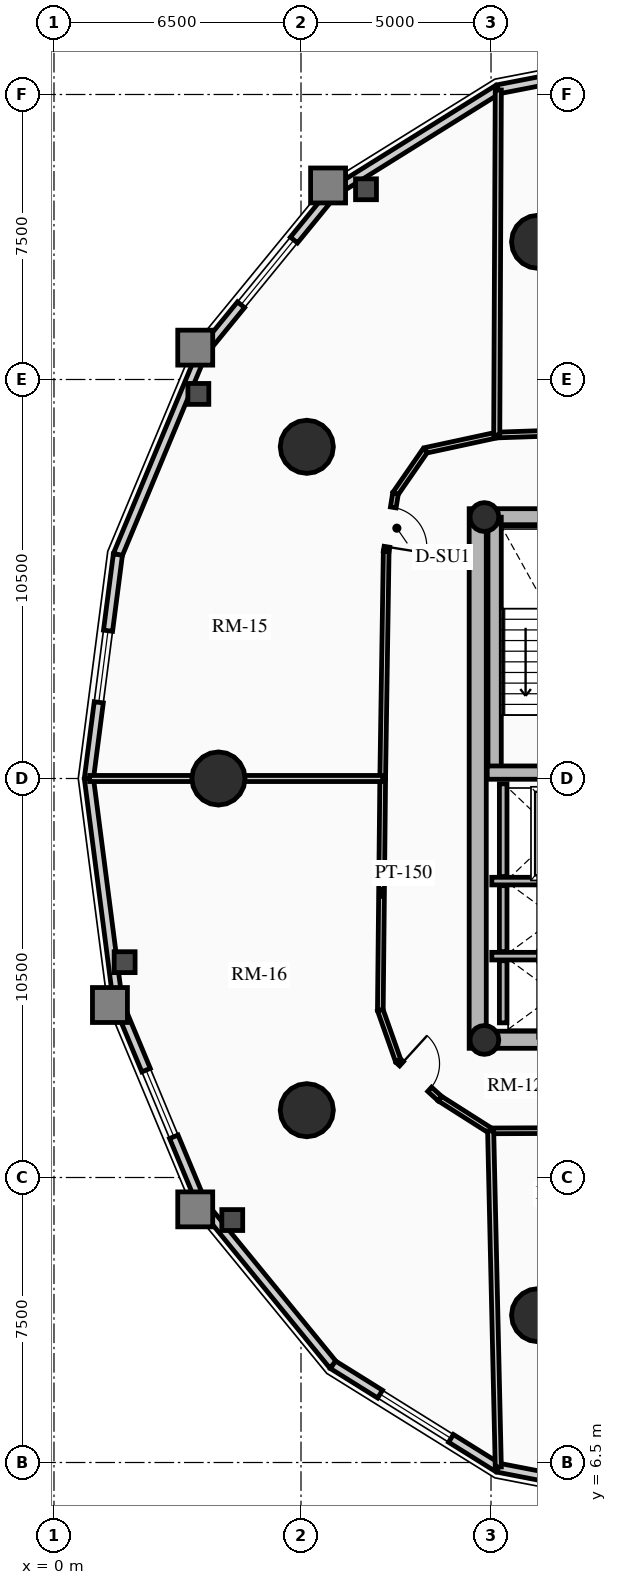
"""IFC4 building model, lengths in metres.
Left out: names, types, materials, properties, quantities, classifications, styles, units other than length and angle.
Written with IfcOpenShell. Run it as: python <this file> out.ifc"""

import sys

from ifc_helpers import new_model, si_unit, direction, frame, frame_2d, origin, origin_2d, place, context, subcontext, project, spatial, rectangle, circle, hollow_circle, extrude, source, transform, mapped, element, fill, save


model = new_model("IFC4")
c1 = context("Model", 3, precision=1e-05, world=origin(), true_north=direction((0.0, 1.0)))
c2 = subcontext(c1, "Body", "Model", "MODEL_VIEW")
j1 = project(units=[si_unit("LENGTHUNIT", "METRE"), si_unit("PLANEANGLEUNIT", "RADIAN")], contexts=[c1])
p1 = place(None, origin())
s1 = spatial("IfcSite", under=j1, at=p1, CompositionType="ELEMENT")
p2 = place(p1, origin())
s2 = spatial("IfcBuilding", under=s1, at=p2, CompositionType="ELEMENT")
p3 = place(p2, frame((0.0, 0.0, 140.32)))
s3 = spatial("IfcBuildingStorey", under=s2, at=p3, CompositionType="ELEMENT", Elevation=140.32)
p4 = place(p3, frame((11.15, 17.4, 0.0), z_axis=(0.0, 0.0, 1.0), x_axis=(0.0, 1.0, 0.0)))
e1 = element("IfcWall", 1, at=p4, inside=s3, PredefinedType="SHEAR", context=c2, shape_type="SweptSolid", body=[
    extrude(rectangle(XDim=14.2, YDim=0.45, at=frame_2d((7.1, 0.0))), origin(), (0.0, 0.0, 1.0), 3.72),
])
p5 = place(p3, frame((11.15, 17.625, 0.0), z_axis=(0.0, 0.0, 1.0), x_axis=(1.0, 0.0, 0.0)))
e2 = element("IfcWall", 2, at=p5, inside=s3, PredefinedType="SHEAR", context=c2, shape_type="SweptSolid", body=[
    extrude(rectangle(XDim=10.7, YDim=0.45, at=frame_2d((5.35, 0.0))), origin(), (0.0, 0.0, 1.0), 3.72),
])
m1 = source(origin(), c2, "Body", "SweptSolid", [
    extrude(rectangle(XDim=1.5, YDim=2.02, at=frame_2d((0.75, 1.01))), frame((0.0, 0.235, 0.0), z_axis=(0.0, -1.0, 0.0), x_axis=(1.0, 0.0, 0.0)), (0.0, 0.0, 1.0), 0.47),
])
p6 = place(p5, frame((5.45, 0.0, 0.0)))
e3 = element("IfcOpeningElement", 3, at=p6, cuts=e2, PredefinedType="OPENING", context=c2, shape_type="MappedRepresentation", body=[
    mapped(m1, transform((0.0, 0.0, 0.0), x_axis=(1.0, 0.0, 0.0), y_axis=(0.0, 1.0, 0.0), z_axis=(0.0, 0.0, 1.0), scale=1.0)),
])
p7 = place(p3, frame((11.15, 31.375, 0.0), z_axis=(0.0, 0.0, 1.0), x_axis=(1.0, 0.0, 0.0)))
e4 = element("IfcWall", 4, at=p7, inside=s3, PredefinedType="SHEAR", context=c2, shape_type="SweptSolid", body=[
    extrude(rectangle(XDim=10.7, YDim=0.45, at=frame_2d((5.35, 0.0))), origin(), (0.0, 0.0, 1.0), 3.72),
])
p8 = place(p7, frame((4.6, 0.0, 0.0)))
e5 = element("IfcOpeningElement", 5, at=p8, cuts=e4, PredefinedType="OPENING", context=c2, shape_type="MappedRepresentation", body=[
    mapped(m1, transform((0.0, 0.0, 0.0), x_axis=(1.0, 0.0, 0.0), y_axis=(0.0, 1.0, 0.0), z_axis=(0.0, 0.0, 1.0), scale=1.0)),
])
p9 = place(p3, frame((11.595, 24.655, 0.0), z_axis=(0.0, 0.0, 1.0), x_axis=(0.0, 1.0, 0.0)))
e6 = element("IfcWall", 6, at=p9, inside=s3, PredefinedType="SHEAR", context=c2, shape_type="SweptSolid", body=[
    extrude(rectangle(XDim=6.72, YDim=0.35, at=frame_2d((3.36, 0.0))), origin(), (0.0, 0.0, 1.0), 3.72),
])
p10 = place(p3, frame((11.4, 24.655, 0.0), z_axis=(0.0, 0.0, 1.0), x_axis=(1.0, 0.0, 0.0)))
e7 = element("IfcWall", 7, at=p10, inside=s3, PredefinedType="SHEAR", context=c2, shape_type="SweptSolid", body=[
    extrude(rectangle(XDim=3.285, YDim=0.35, at=frame_2d((1.643, 0.0))), origin(), (0.0, 0.0, 1.0), 3.72),
])
for number, where, z_axis, x_axis in (
    (8, (11.325, 17.62, 0.0), (0.0, 0.0, 1.0), (1.0, 0.0, 0.0)),
    (9, (11.325, 31.38, 0.0), (0.0, 0.0, 1.0), (1.0, 0.0, 0.0)),
):
    element("IfcColumn", number, at=place(p3, frame(where, z_axis=z_axis, x_axis=x_axis)), inside=s3, PredefinedType="COLUMN", context=c2, shape_type="SweptSolid", body=[
        extrude(hollow_circle(Radius=0.38, WallThickness=0.032, at=origin_2d()), origin(), (0.0, 0.0, 1.0), 3.72),
    ])
for number, where, z_axis, x_axis in (
    (10, (12.739, 38.623, 0.0), (0.0, 0.0, 1.0), (1.0, 0.0, 0.0)),
    (11, (6.653, 33.229, 0.0), (0.0, 0.0, 1.0), (1.0, 0.0, 0.0)),
    (12, (4.328, 24.5, 0.0), (0.0, 0.0, 1.0), (1.0, 0.0, 0.0)),
    (13, (6.653, 15.771, 0.0), (0.0, 0.0, 1.0), (1.0, 0.0, 0.0)),
    (14, (12.739, 10.377, 0.0), (0.0, 0.0, 1.0), (1.0, 0.0, 0.0)),
):
    element("IfcColumn", number, at=place(p3, frame(where, z_axis=z_axis, x_axis=x_axis)), inside=s3, PredefinedType="USERDEFINED", context=c2, shape_type="SweptSolid", body=[
        extrude(circle(Radius=0.7, at=origin_2d()), origin(), (0.0, 0.0, 1.0), 3.72),
    ])
p11 = place(p3, frame((11.685, 42.637, 0.0), z_axis=(0.0, 0.0, 1.0), x_axis=(0.981723785992, 0.190311344954, 0.0)))
e15 = element("IfcWall", 15, at=p11, inside=s3, PredefinedType="SOLIDWALL", context=c2, shape_type="SweptSolid", body=[
    extrude(rectangle(XDim=4.904, YDim=0.24, at=frame_2d((2.452, 0.0))), origin(), (0.0, 0.0, 1.0), 3.465),
])
m2 = source(origin(), c2, "Body", "SweptSolid", [
    extrude(rectangle(XDim=1.9, YDim=1.35, at=frame_2d((0.95, 0.675))), frame((0.0, 0.13, 0.0), z_axis=(0.0, -1.0, 0.0), x_axis=(1.0, 0.0, 0.0)), (0.0, 0.0, 1.0), 0.26),
])
p12 = place(p11, frame((1.502, 0.0, 0.65)))
e16 = element("IfcOpeningElement", 16, at=p12, cuts=e15, PredefinedType="OPENING", context=c2, shape_type="MappedRepresentation", body=[
    mapped(m2, transform((0.0, 0.0, 0.0), x_axis=(1.0, 0.0, 0.0), y_axis=(0.0, 1.0, 0.0), z_axis=(0.0, 0.0, 1.0), scale=1.0)),
])
p13 = place(p3, frame((7.342, 39.928, 0.0), z_axis=(0.0, 0.0, 1.0), x_axis=(0.848520380187, 0.529162701263, 0.0)))
e17 = element("IfcWall", 17, at=p13, inside=s3, PredefinedType="SOLIDWALL", context=c2, shape_type="SweptSolid", body=[
    extrude(rectangle(XDim=5.119, YDim=0.24, at=frame_2d((2.56, 0.0))), origin(), (0.0, 0.0, 1.0), 3.465),
])
p14 = place(p3, frame((3.895, 35.709, 0.0), z_axis=(0.0, 0.0, 1.0), x_axis=(0.632700781152, 0.77439635945, 0.0)))
e18 = element("IfcWall", 18, at=p14, inside=s3, PredefinedType="SOLIDWALL", context=c2, shape_type="SweptSolid", body=[
    extrude(rectangle(XDim=5.448, YDim=0.24, at=frame_2d((2.724, 0.0))), origin(), (0.0, 0.0, 1.0), 3.465),
])
m3 = source(origin(), c2, "Body", "SweptSolid", [
    extrude(rectangle(XDim=2.2, YDim=1.35, at=frame_2d((1.1, 0.675))), frame((0.0, 0.13, 0.0), z_axis=(0.0, -1.0, 0.0), x_axis=(1.0, 0.0, 0.0)), (0.0, 0.0, 1.0), 0.26),
])
p15 = place(p14, frame((1.624, 0.0, 0.65)))
e19 = element("IfcOpeningElement", 19, at=p15, cuts=e18, PredefinedType="OPENING", context=c2, shape_type="MappedRepresentation", body=[
    mapped(m3, transform((0.0, 0.0, 0.0), x_axis=(1.0, 0.0, 0.0), y_axis=(0.0, 1.0, 0.0), z_axis=(0.0, 0.0, 1.0), scale=1.0)),
])
p16 = place(p3, frame((1.682, 30.393, 0.0), z_axis=(0.0, 0.0, 1.0), x_axis=(0.384344417632, 0.923189779317, 0.0)))
e20 = element("IfcWall", 20, at=p16, inside=s3, PredefinedType="SOLIDWALL", context=c2, shape_type="SweptSolid", body=[
    extrude(rectangle(XDim=5.758, YDim=0.24, at=frame_2d((2.879, 0.0))), origin(), (0.0, 0.0, 1.0), 3.465),
])
p17 = place(p3, frame((0.919, 24.5, 0.0), z_axis=(0.0, 0.0, 1.0), x_axis=(0.128351991996, 0.991728675672, 0.0)))
e21 = element("IfcWall", 21, at=p17, inside=s3, PredefinedType="SOLIDWALL", context=c2, shape_type="SweptSolid", body=[
    extrude(rectangle(XDim=5.942, YDim=0.24, at=frame_2d((2.971, 0.0))), origin(), (0.0, 0.0, 1.0), 3.465),
])
p18 = place(p17, frame((2.021, 0.0, 0.65)))
e22 = element("IfcOpeningElement", 22, at=p18, cuts=e21, PredefinedType="OPENING", context=c2, shape_type="MappedRepresentation", body=[
    mapped(m2, transform((0.0, 0.0, 0.0), x_axis=(1.0, 0.0, 0.0), y_axis=(0.0, 1.0, 0.0), z_axis=(0.0, 0.0, 1.0), scale=1.0)),
])
p19 = place(p3, frame((1.682, 18.607, 0.0), z_axis=(0.0, 0.0, 1.0), x_axis=(-0.128351991996, 0.991728675672, 0.0)))
e23 = element("IfcWall", 23, at=p19, inside=s3, PredefinedType="SOLIDWALL", context=c2, shape_type="SweptSolid", body=[
    extrude(rectangle(XDim=5.942, YDim=0.24, at=frame_2d((2.971, 0.0))), origin(), (0.0, 0.0, 1.0), 3.465),
])
p20 = place(p3, frame((3.895, 13.291, 0.0), z_axis=(0.0, 0.0, 1.0), x_axis=(-0.384344417632, 0.923189779317, 0.0)))
e24 = element("IfcWall", 24, at=p20, inside=s3, PredefinedType="SOLIDWALL", context=c2, shape_type="SweptSolid", body=[
    extrude(rectangle(XDim=5.758, YDim=0.24, at=frame_2d((2.879, 0.0))), origin(), (0.0, 0.0, 1.0), 3.465),
])
p21 = place(p20, frame((1.929, 0.0, 0.65)))
e25 = element("IfcOpeningElement", 25, at=p21, cuts=e24, PredefinedType="OPENING", context=c2, shape_type="MappedRepresentation", body=[
    mapped(m2, transform((0.0, 0.0, 0.0), x_axis=(1.0, 0.0, 0.0), y_axis=(0.0, 1.0, 0.0), z_axis=(0.0, 0.0, 1.0), scale=1.0)),
])
p22 = place(p3, frame((7.342, 9.072, 0.0), z_axis=(0.0, 0.0, 1.0), x_axis=(-0.632700781152, 0.77439635945, 0.0)))
e26 = element("IfcWall", 26, at=p22, inside=s3, PredefinedType="SOLIDWALL", context=c2, shape_type="SweptSolid", body=[
    extrude(rectangle(XDim=5.448, YDim=0.24, at=frame_2d((2.724, 0.0))), origin(), (0.0, 0.0, 1.0), 3.465),
])
p23 = place(p3, frame((11.685, 6.363, 0.0), z_axis=(0.0, 0.0, 1.0), x_axis=(-0.848520380187, 0.529162701263, 0.0)))
e27 = element("IfcWall", 27, at=p23, inside=s3, PredefinedType="SOLIDWALL", context=c2, shape_type="SweptSolid", body=[
    extrude(rectangle(XDim=5.119, YDim=0.24, at=frame_2d((2.56, 0.0))), origin(), (0.0, 0.0, 1.0), 3.465),
])
p24 = place(p23, frame((1.459, 0.0, 0.65)))
e28 = element("IfcOpeningElement", 28, at=p24, cuts=e27, PredefinedType="OPENING", context=c2, shape_type="MappedRepresentation", body=[
    mapped(m3, transform((0.0, 0.0, 0.0), x_axis=(1.0, 0.0, 0.0), y_axis=(0.0, 1.0, 0.0), z_axis=(0.0, 0.0, 1.0), scale=1.0)),
])
p25 = place(p3, frame((16.5, 5.43, 0.0), z_axis=(0.0, 0.0, 1.0), x_axis=(-0.981723785992, 0.190311344954, 0.0)))
e29 = element("IfcWall", 29, at=p25, inside=s3, PredefinedType="SOLIDWALL", context=c2, shape_type="SweptSolid", body=[
    extrude(rectangle(XDim=4.904, YDim=0.24, at=frame_2d((2.452, 0.0))), origin(), (0.0, 0.0, 1.0), 3.465),
])
p26 = place(p25, frame((1.502, 0.0, 0.65)))
e30 = element("IfcOpeningElement", 30, at=p26, cuts=e29, PredefinedType="OPENING", context=c2, shape_type="MappedRepresentation", body=[
    mapped(m2, transform((0.0, 0.0, 0.0), x_axis=(1.0, 0.0, 0.0), y_axis=(0.0, 1.0, 0.0), z_axis=(0.0, 0.0, 1.0), scale=1.0)),
])
p27 = place(p3, frame((11.52, 21.8, 0.0), z_axis=(0.0, 0.0, 1.0), x_axis=(1.0, 0.0, 0.0)))
e31 = element("IfcWall", 31, at=p27, inside=s3, PredefinedType="SHEAR", context=c2, shape_type="SweptSolid", body=[
    extrude(rectangle(XDim=2.97, YDim=0.2, at=frame_2d((1.485, 0.0))), origin(), (0.0, 0.0, 1.0), 3.72),
])
p28 = place(p3, frame((11.82, 21.92, 0.0), z_axis=(0.0, 0.0, 1.0), x_axis=(0.0, 1.0, 0.0)))
e32 = element("IfcWall", 32, at=p28, inside=s3, PredefinedType="SHEAR", context=c2, shape_type="SweptSolid", body=[
    extrude(rectangle(XDim=2.44, YDim=0.2, at=frame_2d((1.22, 0.0))), origin(), (0.0, 0.0, 1.0), 3.72),
])
p29 = place(p3, frame((11.52, 19.825, 0.0), z_axis=(0.0, 0.0, 1.0), x_axis=(1.0, 0.0, 0.0)))
e33 = element("IfcWall", 33, at=p29, inside=s3, PredefinedType="SHEAR", context=c2, shape_type="SweptSolid", body=[
    extrude(rectangle(XDim=2.97, YDim=0.2, at=frame_2d((1.485, 0.0))), origin(), (0.0, 0.0, 1.0), 3.72),
])
p30 = place(p3, frame((11.82, 19.945, 0.0), z_axis=(0.0, 0.0, 1.0), x_axis=(0.0, 1.0, 0.0)))
e34 = element("IfcWall", 34, at=p30, inside=s3, PredefinedType="SHEAR", context=c2, shape_type="SweptSolid", body=[
    extrude(rectangle(XDim=1.735, YDim=0.2, at=frame_2d((0.867, 0.0))), origin(), (0.0, 0.0, 1.0), 3.72),
])
p31 = place(p3, frame((11.82, 18.07, 0.0), z_axis=(0.0, 0.0, 1.0), x_axis=(0.0, 1.0, 0.0)))
e35 = element("IfcWall", 35, at=p31, inside=s3, PredefinedType="SHEAR", context=c2, shape_type="SweptSolid", body=[
    extrude(rectangle(XDim=1.635, YDim=0.2, at=frame_2d((0.817, 0.0))), origin(), (0.0, 0.0, 1.0), 3.72),
])
p32 = place(p3, frame((18.133, 33.76, 0.0), z_axis=(0.0, 0.0, 1.0), x_axis=(-0.999419643988, -0.034064280574, 0.0)))
e36 = element("IfcWall", 36, at=p32, inside=s3, PredefinedType="PARTITIONING", context=c2, shape_type="SweptSolid", body=[
    extrude(rectangle(XDim=6.486, YDim=0.15, at=frame_2d((3.243, 0.0))), origin(), (0.0, 0.0, 1.0), 3.035),
])
p33 = place(p3, frame((11.65, 33.539, 0.0), z_axis=(0.0, 0.0, 1.0), x_axis=(-0.977535921581, -0.210768882949, 0.0)))
e37 = element("IfcWall", 37, at=p33, inside=s3, PredefinedType="PARTITIONING", context=c2, shape_type="SweptSolid", body=[
    extrude(rectangle(XDim=1.923, YDim=0.15, at=frame_2d((0.961, 0.0))), origin(), (0.0, 0.0, 1.0), 3.035),
])
p34 = place(p3, frame((9.771, 33.133, 0.0), z_axis=(0.0, 0.0, 1.0), x_axis=(-0.568464531016, -0.822707771312, 0.0)))
e38 = element("IfcWall", 38, at=p34, inside=s3, PredefinedType="PARTITIONING", context=c2, shape_type="SweptSolid", body=[
    extrude(rectangle(XDim=1.38, YDim=0.15, at=frame_2d((0.69, 0.0))), origin(), (0.0, 0.0, 1.0), 3.035),
])
p35 = place(p3, frame((8.986, 31.998, 0.0), z_axis=(0.0, 0.0, 1.0), x_axis=(-0.158992972351, -0.98727971454, 0.0)))
e39 = element("IfcWall", 39, at=p35, inside=s3, PredefinedType="PARTITIONING", context=c2, shape_type="SweptSolid", body=[
    extrude(rectangle(XDim=1.539, YDim=0.15, at=frame_2d((0.769, 0.0))), origin(), (0.0, 0.0, 1.0), 3.035),
])
m4 = source(origin(), c2, "Body", "SweptSolid", [
    extrude(rectangle(XDim=1.05, YDim=2.015, at=frame_2d((0.525, 1.007))), frame((0.0, 0.085, 0.0), z_axis=(0.0, -1.0, 0.0), x_axis=(1.0, 0.0, 0.0)), (0.0, 0.0, 1.0), 0.17),
])
p36 = place(p35, frame((0.369, 0.0, 0.0)))
e40 = element("IfcOpeningElement", 40, at=p36, cuts=e39, PredefinedType="OPENING", context=c2, shape_type="MappedRepresentation", body=[
    mapped(m4, transform((0.0, 0.0, 0.0), x_axis=(1.0, 0.0, 0.0), y_axis=(0.0, 1.0, 0.0), z_axis=(0.0, 0.0, 1.0), scale=1.0)),
])
p37 = place(p3, frame((8.742, 30.479, 0.0), z_axis=(0.0, 0.0, 1.0), x_axis=(-0.015351396174, -0.999882160375, 0.0)))
e41 = element("IfcWall", 41, at=p37, inside=s3, PredefinedType="PARTITIONING", context=c2, shape_type="SweptSolid", body=[
    extrude(rectangle(XDim=5.98, YDim=0.15, at=frame_2d((2.99, 0.0))), origin(), (0.0, 0.0, 1.0), 3.465),
])
p38 = place(p3, frame((8.65, 24.5, 0.0), z_axis=(0.0, 0.0, 1.0), x_axis=(-0.010250943023, -0.999947457703, 0.0)))
e42 = element("IfcWall", 42, at=p38, inside=s3, PredefinedType="PARTITIONING", context=c2, shape_type="SweptSolid", body=[
    extrude(rectangle(XDim=6.097, YDim=0.15, at=frame_2d((3.048, 0.0))), origin(), (0.0, 0.0, 1.0), 3.035),
])
p39 = place(p3, frame((8.587, 18.403, 0.0), z_axis=(0.0, 0.0, 1.0), x_axis=(0.333119120686, -0.942884749815, 0.0)))
e43 = element("IfcWall", 43, at=p39, inside=s3, PredefinedType="PARTITIONING", context=c2, shape_type="SweptSolid", body=[
    extrude(rectangle(XDim=1.409, YDim=0.15, at=frame_2d((0.705, 0.0))), origin(), (0.0, 0.0, 1.0), 3.035),
])
p40 = place(p3, frame((9.057, 17.074, 0.0), z_axis=(0.0, 0.0, 1.0), x_axis=(0.739999571423, -0.672607340351, 0.0)))
e44 = element("IfcWall", 44, at=p40, inside=s3, PredefinedType="PARTITIONING", context=c2, shape_type="SweptSolid", body=[
    extrude(rectangle(XDim=1.485, YDim=0.15, at=frame_2d((0.743, 0.0))), origin(), (0.0, 0.0, 1.0), 3.035),
])
m5 = source(origin(), c2, "Body", "SweptSolid", [
    extrude(rectangle(XDim=1.0, YDim=2.015, at=frame_2d((0.5, 1.007))), frame((0.0, 0.085, 0.0), z_axis=(0.0, -1.0, 0.0), x_axis=(1.0, 0.0, 0.0)), (0.0, 0.0, 1.0), 0.17),
])
p41 = place(p40, frame((0.12, 0.0, 0.0)))
e45 = element("IfcOpeningElement", 45, at=p41, cuts=e44, PredefinedType="OPENING", context=c2, shape_type="MappedRepresentation", body=[
    mapped(m5, transform((0.0, 0.0, 0.0), x_axis=(1.0, 0.0, 0.0), y_axis=(0.0, 1.0, 0.0), z_axis=(0.0, 0.0, 1.0), scale=1.0)),
])
p42 = place(p3, frame((10.156, 16.075, 0.0), z_axis=(0.0, 0.0, 1.0), x_axis=(0.843896624713, -0.536505812455, 0.0)))
e46 = element("IfcWall", 46, at=p42, inside=s3, PredefinedType="PARTITIONING", context=c2, shape_type="SweptSolid", body=[
    extrude(rectangle(XDim=1.581, YDim=0.15, at=frame_2d((0.791, 0.0))), origin(), (0.0, 0.0, 1.0), 3.035),
])
p43 = place(p3, frame((11.49, 15.227, 0.0), z_axis=(0.0, 0.0, 1.0), x_axis=(0.999991728046, 0.004067411998, 0.0)))
e47 = element("IfcWall", 47, at=p43, inside=s3, PredefinedType="PARTITIONING", context=c2, shape_type="SweptSolid", body=[
    extrude(rectangle(XDim=3.301, YDim=0.15, at=frame_2d((1.651, 0.0))), origin(), (0.0, 0.0, 1.0), 3.035),
])
p44 = place(p3, frame((11.65, 33.539, 0.0), z_axis=(0.0, 0.0, 1.0), x_axis=(0.00451754022, 0.999989795863, 0.0)))
e48 = element("IfcWall", 48, at=p44, inside=s3, PredefinedType="PARTITIONING", context=c2, shape_type="SweptSolid", body=[
    extrude(rectangle(XDim=9.079, YDim=0.16, at=frame_2d((4.54, 0.0))), origin(), (0.0, 0.0, 1.0), 2.989),
])
p45 = place(p3, frame((8.65, 24.5, 0.0), z_axis=(0.0, 0.0, 1.0), x_axis=(-1.0, 0.0, 0.0)))
e49 = element("IfcWall", 49, at=p45, inside=s3, PredefinedType="PARTITIONING", context=c2, shape_type="SweptSolid", body=[
    extrude(rectangle(XDim=7.711, YDim=0.16, at=frame_2d((3.855, 0.0))), origin(), (0.0, 0.0, 1.0), 2.989),
])
p46 = place(p3, frame((11.49, 15.227, 0.0), z_axis=(0.0, 0.0, 1.0), x_axis=(0.022711375682, -0.999742063442, 0.0)))
e50 = element("IfcWall", 50, at=p46, inside=s3, PredefinedType="PARTITIONING", context=c2, shape_type="SweptSolid", body=[
    extrude(rectangle(XDim=8.847, YDim=0.16, at=frame_2d((4.423, 0.0))), origin(), (0.0, 0.0, 1.0), 2.989),
])
m6 = source(origin(), c2, "Body", "SweptSolid", [
    extrude(rectangle(XDim=2.2, YDim=1.35, at=frame_2d((1.1, 0.675))), frame((0.0, 0.03, 0.0), z_axis=(0.0, -1.0, 0.0), x_axis=(1.0, 0.0, 0.0)), (0.0, 0.0, 1.0), 0.06),
])
p47 = place(p15, origin())
e51 = element("IfcWindow", 51, at=p47, inside=s3, PartitioningType="DOUBLE_PANEL_VERTICAL", PredefinedType="WINDOW", context=c2, shape_type="MappedRepresentation", body=[
    mapped(m6, transform((0.0, 0.0, 0.0), x_axis=(1.0, 0.0, 0.0), y_axis=(0.0, 1.0, 0.0), z_axis=(0.0, 0.0, 1.0), scale=1.0)),
])
fill(e19, e51)
m7 = source(origin(), c2, "Body", "SweptSolid", [
    extrude(rectangle(XDim=1.9, YDim=1.35, at=frame_2d((0.95, 0.675))), frame((0.0, 0.03, 0.0), z_axis=(0.0, -1.0, 0.0), x_axis=(1.0, 0.0, 0.0)), (0.0, 0.0, 1.0), 0.06),
])
p48 = place(p18, origin())
e52 = element("IfcWindow", 52, at=p48, inside=s3, PartitioningType="DOUBLE_PANEL_VERTICAL", PredefinedType="WINDOW", context=c2, shape_type="MappedRepresentation", body=[
    mapped(m7, transform((0.0, 0.0, 0.0), x_axis=(1.0, 0.0, 0.0), y_axis=(0.0, 1.0, 0.0), z_axis=(0.0, 0.0, 1.0), scale=1.0)),
])
fill(e22, e52)
p49 = place(p21, origin())
e53 = element("IfcWindow", 53, at=p49, inside=s3, PartitioningType="DOUBLE_PANEL_VERTICAL", PredefinedType="WINDOW", context=c2, shape_type="MappedRepresentation", body=[
    mapped(m7, transform((0.0, 0.0, 0.0), x_axis=(1.0, 0.0, 0.0), y_axis=(0.0, 1.0, 0.0), z_axis=(0.0, 0.0, 1.0), scale=1.0)),
])
fill(e25, e53)
p50 = place(p24, origin())
e54 = element("IfcWindow", 54, at=p50, inside=s3, PartitioningType="DOUBLE_PANEL_VERTICAL", PredefinedType="WINDOW", context=c2, shape_type="MappedRepresentation", body=[
    mapped(m6, transform((0.0, 0.0, 0.0), x_axis=(1.0, 0.0, 0.0), y_axis=(0.0, 1.0, 0.0), z_axis=(0.0, 0.0, 1.0), scale=1.0)),
])
fill(e28, e54)
m8 = source(origin(), c2, "Body", "SweptSolid", [
    extrude(rectangle(XDim=1.05, YDim=2.015, at=frame_2d((0.525, 1.007))), frame((0.0, 0.025, 0.0), z_axis=(0.0, -1.0, 0.0), x_axis=(1.0, 0.0, 0.0)), (0.0, 0.0, 1.0), 0.05),
])
p51 = place(p36, origin())
e55 = element("IfcDoor", 55, at=p51, inside=s3, OperationType="SINGLE_SWING_RIGHT", PredefinedType="DOOR", context=c2, shape_type="MappedRepresentation", body=[
    mapped(m8, transform((0.0, 0.0, 0.0), x_axis=(1.0, 0.0, 0.0), y_axis=(0.0, 1.0, 0.0), z_axis=(0.0, 0.0, 1.0), scale=1.0)),
])
fill(e40, e55)
m9 = source(origin(), c2, "Body", "SweptSolid", [
    extrude(rectangle(XDim=1.0, YDim=2.015, at=frame_2d((0.5, 1.007))), frame((0.0, 0.025, 0.0), z_axis=(0.0, -1.0, 0.0), x_axis=(1.0, 0.0, 0.0)), (0.0, 0.0, 1.0), 0.05),
])
p52 = place(p41, origin())
e56 = element("IfcDoor", 56, at=p52, inside=s3, OperationType="SINGLE_SWING_LEFT", PredefinedType="DOOR", context=c2, shape_type="MappedRepresentation", body=[
    mapped(m9, transform((0.0, 0.0, 0.0), x_axis=(1.0, 0.0, 0.0), y_axis=(0.0, 1.0, 0.0), z_axis=(0.0, 0.0, 1.0), scale=1.0)),
])
fill(e45, e56)
save(model, sys.argv[1])
